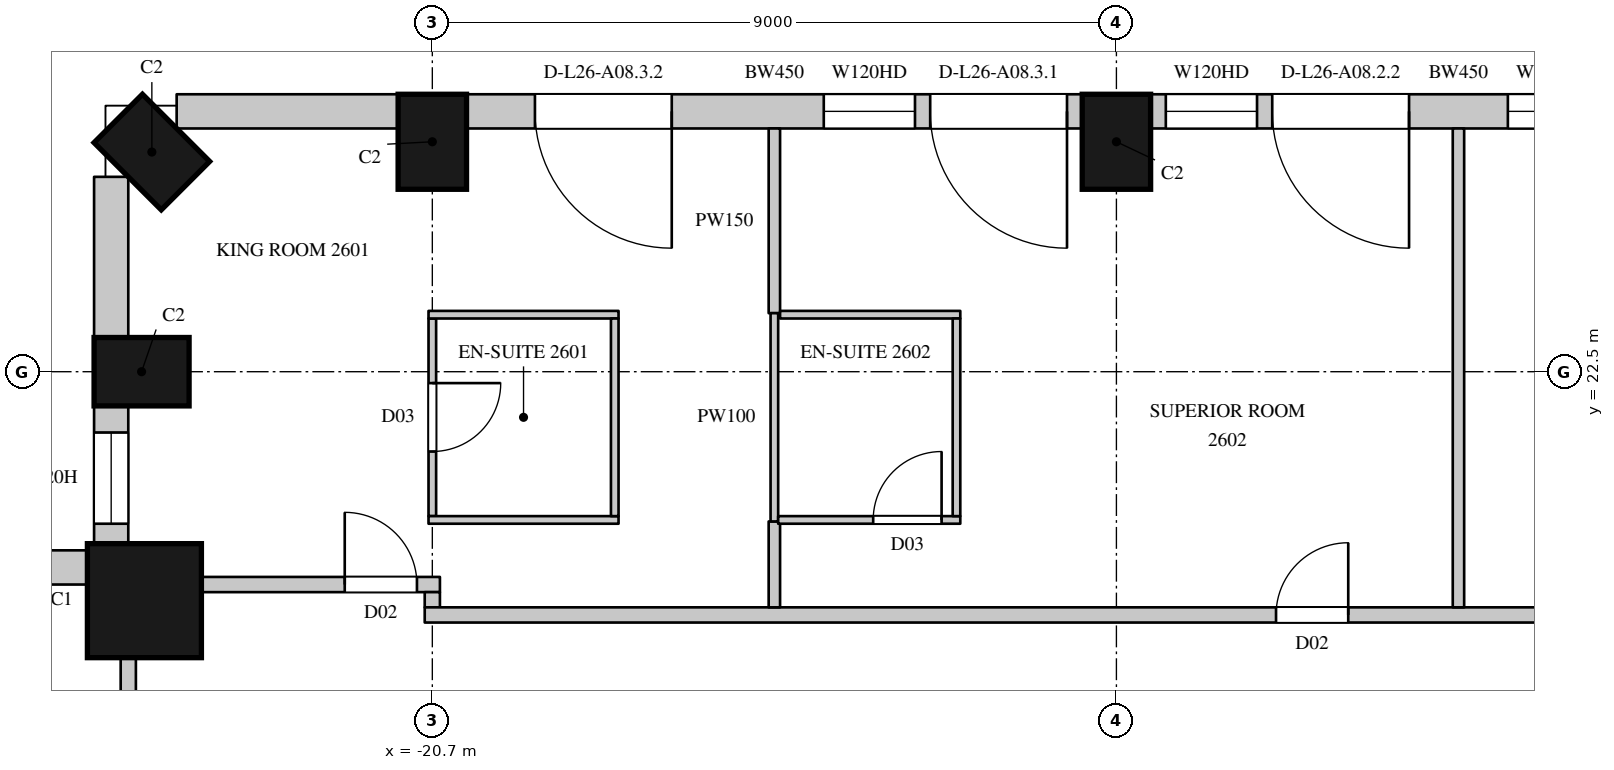
"""IFC4 building model, lengths in metres.
Left out: names, types, materials, properties, quantities, classifications, styles, units other than length and angle.
Written with IfcOpenShell. Run it as: python <this file> out.ifc"""

import sys

from ifc_helpers import new_model, si_unit, direction, frame, frame_2d, origin, origin_2d, place, context, subcontext, project, spatial, rectangle, circle, extrude, element, fill, save


model = new_model("IFC4")
c1 = context("Model", 3, precision=1e-05, world=origin(), true_north=direction((0.0, 1.0)))
c2 = subcontext(c1, "Body", "Model", "MODEL_VIEW")
j1 = project(units=[si_unit("LENGTHUNIT", "METRE"), si_unit("PLANEANGLEUNIT", "RADIAN")], contexts=[c1])
p1 = place(None, origin())
s1 = spatial("IfcSite", under=j1, at=p1, CompositionType="ELEMENT")
p2 = place(p1, origin())
s2 = spatial("IfcBuilding", under=s1, at=p2, CompositionType="ELEMENT")
p3 = place(p2, frame((0.0, 0.0, 123.9)))
s3 = spatial("IfcBuildingStorey", under=s2, at=p3, CompositionType="ELEMENT", Elevation=123.9)
for number, where, z_axis, x_axis in (
    (1, (-11.7, 25.525, 0.0), (0.0, 0.0, 1.0), (-1.0, 0.0, 0.0)),
    (2, (-20.7, 25.525, 0.0), (0.0, 0.0, 1.0), (-1.0, 0.0, 0.0)),
    (3, (-24.39, 25.39, 0.0), (0.0, 0.0, 1.0), (-0.707, -0.707, 0.0)),
    (4, (-24.525, 22.5, 0.0), (0.0, 0.0, 1.0), (0.0, -1.0, 0.0)),
):
    element("IfcColumn", number, at=place(p3, frame(where, z_axis=z_axis, x_axis=x_axis)), inside=s3, PredefinedType="COLUMN", context=c2, shape_type="SweptSolid", body=[
        extrude(rectangle(XDim=0.9, YDim=1.25, at=origin_2d()), origin(), (0.0, 0.0, 1.0), 3.6),
    ])
p4 = place(p3, frame((-24.488, 19.488, 0.0), z_axis=(0.0, 0.0, 1.0), x_axis=(1.0, 0.0, 0.0)))
e5 = element("IfcColumn", 5, at=p4, inside=s3, PredefinedType="COLUMN", context=c2, shape_type="SweptSolid", body=[
    extrude(circle(Radius=0.75, at=origin_2d()), origin(), (0.0, 0.0, 1.0), 3.6),
])
p5 = place(p3, frame((-3.15, 25.925, 0.0), z_axis=(0.0, 0.0, 1.0), x_axis=(-1.0, 0.0, 0.0)))
e6 = element("IfcWall", 6, at=p5, inside=s3, PredefinedType="SOLIDWALL", context=c2, shape_type="SweptSolid", body=[
    extrude(rectangle(XDim=8.1, YDim=0.45, at=frame_2d((4.05, 0.0))), origin(), (0.0, 0.0, 1.0), 3.3),
])
p6 = place(p5, frame((0.2, 0.0, 0.0)))
e7 = element("IfcOpeningElement", 7, at=p6, cuts=e6, PredefinedType="OPENING", context=c2, shape_type="SweptSolid", body=[
    extrude(rectangle(XDim=1.8, YDim=2.4, at=frame_2d((0.9, 1.2))), frame((0.0, 0.235, 0.0), z_axis=(0.0, -1.0, 0.0), x_axis=(1.0, 0.0, 0.0)), (0.0, 0.0, 1.0), 0.47),
])
p7 = place(p5, frame((2.2, 0.0, 1.05)))
e8 = element("IfcOpeningElement", 8, at=p7, cuts=e6, PredefinedType="OPENING", context=c2, shape_type="SweptSolid", body=[
    extrude(rectangle(XDim=1.2, YDim=2.0, at=frame_2d((0.6, 1.0))), frame((0.0, 0.235, 0.0), z_axis=(0.0, -1.0, 0.0), x_axis=(1.0, 0.0, 0.0)), (0.0, 0.0, 1.0), 0.47),
])
p8 = place(p5, frame((4.7, 0.0, 0.0)))
e9 = element("IfcOpeningElement", 9, at=p8, cuts=e6, PredefinedType="OPENING", context=c2, shape_type="SweptSolid", body=[
    extrude(rectangle(XDim=1.8, YDim=2.4, at=frame_2d((0.9, 1.2))), frame((0.0, 0.235, 0.0), z_axis=(0.0, -1.0, 0.0), x_axis=(1.0, 0.0, 0.0)), (0.0, 0.0, 1.0), 0.47),
])
p9 = place(p5, frame((6.7, 0.0, 1.05)))
e10 = element("IfcOpeningElement", 10, at=p9, cuts=e6, PredefinedType="OPENING", context=c2, shape_type="SweptSolid", body=[
    extrude(rectangle(XDim=1.2, YDim=2.0, at=frame_2d((0.6, 1.0))), frame((0.0, 0.235, 0.0), z_axis=(0.0, -1.0, 0.0), x_axis=(1.0, 0.0, 0.0)), (0.0, 0.0, 1.0), 0.47),
])
p10 = place(p3, frame((-12.15, 25.925, 0.0), z_axis=(0.0, 0.0, 1.0), x_axis=(-1.0, 0.0, 0.0)))
e11 = element("IfcWall", 11, at=p10, inside=s3, PredefinedType="SOLIDWALL", context=c2, shape_type="SweptSolid", body=[
    extrude(rectangle(XDim=8.1, YDim=0.45, at=frame_2d((4.05, 0.0))), origin(), (0.0, 0.0, 1.0), 3.3),
])
p11 = place(p10, frame((0.2, 0.0, 0.0)))
e12 = element("IfcOpeningElement", 12, at=p11, cuts=e11, PredefinedType="OPENING", context=c2, shape_type="SweptSolid", body=[
    extrude(rectangle(XDim=1.8, YDim=2.4, at=frame_2d((0.9, 1.2))), frame((0.0, 0.235, 0.0), z_axis=(0.0, -1.0, 0.0), x_axis=(1.0, 0.0, 0.0)), (0.0, 0.0, 1.0), 0.47),
])
p12 = place(p10, frame((2.2, 0.0, 1.05)))
e13 = element("IfcOpeningElement", 13, at=p12, cuts=e11, PredefinedType="OPENING", context=c2, shape_type="SweptSolid", body=[
    extrude(rectangle(XDim=1.2, YDim=2.0, at=frame_2d((0.6, 1.0))), frame((0.0, 0.235, 0.0), z_axis=(0.0, -1.0, 0.0), x_axis=(1.0, 0.0, 0.0)), (0.0, 0.0, 1.0), 0.47),
])
p13 = place(p10, frame((5.4, 0.0, 0.0)))
e14 = element("IfcOpeningElement", 14, at=p13, cuts=e11, PredefinedType="OPENING", context=c2, shape_type="SweptSolid", body=[
    extrude(rectangle(XDim=1.8, YDim=2.4, at=frame_2d((0.9, 1.2))), frame((0.0, 0.235, 0.0), z_axis=(0.0, -1.0, 0.0), x_axis=(1.0, 0.0, 0.0)), (0.0, 0.0, 1.0), 0.47),
])
p14 = place(p3, frame((-21.15, 25.925, 0.0), z_axis=(0.0, 0.0, 1.0), x_axis=(-1.0, 0.0, 0.0)))
e15 = element("IfcWall", 15, at=p14, inside=s3, PredefinedType="SOLIDWALL", context=c2, shape_type="SweptSolid", body=[
    extrude(rectangle(XDim=2.914, YDim=0.45, at=frame_2d((1.457, 0.0))), origin(), (0.0, 0.0, 1.0), 3.3),
])
p15 = place(p3, frame((-24.925, 25.064, 0.0), z_axis=(0.0, 0.0, 1.0), x_axis=(0.0, -1.0, 0.0)))
e16 = element("IfcWall", 16, at=p15, inside=s3, PredefinedType="SOLIDWALL", context=c2, shape_type="SweptSolid", body=[
    extrude(rectangle(XDim=2.114, YDim=0.45, at=frame_2d((1.057, 0.0))), origin(), (0.0, 0.0, 1.0), 3.3),
])
p16 = place(p3, frame((-24.925, 22.05, 0.0), z_axis=(0.0, 0.0, 1.0), x_axis=(0.0, -1.0, 0.0)))
e17 = element("IfcWall", 17, at=p16, inside=s3, PredefinedType="SOLIDWALL", context=c2, shape_type="SweptSolid", body=[
    extrude(rectangle(XDim=1.843, YDim=0.45, at=frame_2d((0.921, 0.0))), origin(), (0.0, 0.0, 1.0), 3.3),
])
p17 = place(p16, frame((0.35, 0.0, 1.05)))
e18 = element("IfcOpeningElement", 18, at=p17, cuts=e17, PredefinedType="OPENING", context=c2, shape_type="SweptSolid", body=[
    extrude(rectangle(XDim=1.2, YDim=2.0, at=frame_2d((0.6, 1.0))), frame((0.0, 0.235, 0.0), z_axis=(0.0, -1.0, 0.0), x_axis=(1.0, 0.0, 0.0)), (0.0, 0.0, 1.0), 0.47),
])
p18 = place(p3, frame((-25.207, 19.925, 0.0), z_axis=(0.0, 0.0, 1.0), x_axis=(-1.0, 0.0, 0.0)))
e19 = element("IfcWall", 19, at=p18, inside=s3, PredefinedType="SOLIDWALL", context=c2, shape_type="SweptSolid", body=[
    extrude(rectangle(XDim=3.857, YDim=0.45, at=frame_2d((1.928, 0.0))), origin(), (0.0, 0.0, 1.0), 3.3),
])
p19 = place(p18, frame((0.643, 0.0, 1.05)))
e20 = element("IfcOpeningElement", 20, at=p19, cuts=e19, PredefinedType="OPENING", context=c2, shape_type="SweptSolid", body=[
    extrude(rectangle(XDim=2.7, YDim=2.0, at=frame_2d((1.35, 1.0))), frame((0.0, 0.235, 0.0), z_axis=(0.0, -1.0, 0.0), x_axis=(1.0, 0.0, 0.0)), (0.0, 0.0, 1.0), 0.47),
])
p20 = place(p3, frame((-24.7, 16.03, 0.0), z_axis=(0.0, 0.0, 1.0), x_axis=(0.0, 1.0, 0.0)))
e21 = element("IfcWall", 21, at=p20, inside=s3, PredefinedType="PARTITIONING", context=c2, shape_type="SweptSolid", body=[
    extrude(rectangle(XDim=2.722, YDim=0.2, at=frame_2d((1.361, 0.0))), origin(), (0.0, 0.0, 1.0), 3.3),
])
p21 = place(p20, frame((0.45, 0.0, 0.0)))
e22 = element("IfcOpeningElement", 22, at=p21, cuts=e21, PredefinedType="OPENING", context=c2, shape_type="SweptSolid", body=[
    extrude(rectangle(XDim=1.6, YDim=2.4, at=frame_2d((0.8, 1.2))), frame((0.0, 0.11, 0.0), z_axis=(0.0, -1.0, 0.0), x_axis=(1.0, 0.0, 0.0)), (0.0, 0.0, 1.0), 0.22),
])
p22 = place(p3, frame((-23.752, 19.7, 0.0), z_axis=(0.0, 0.0, 1.0), x_axis=(1.0, 0.0, 0.0)))
e23 = element("IfcWall", 23, at=p22, inside=s3, PredefinedType="PARTITIONING", context=c2, shape_type="SweptSolid", body=[
    extrude(rectangle(XDim=3.152, YDim=0.2, at=frame_2d((1.576, 0.0))), origin(), (0.0, 0.0, 1.0), 3.3),
])
p23 = place(p22, frame((1.9, 0.0, 0.0)))
e24 = element("IfcOpeningElement", 24, at=p23, cuts=e23, PredefinedType="OPENING", context=c2, shape_type="SweptSolid", body=[
    extrude(rectangle(XDim=0.95, YDim=2.2, at=frame_2d((0.475, 1.1))), frame((0.0, 0.11, 0.0), z_axis=(0.0, -1.0, 0.0), x_axis=(1.0, 0.0, 0.0)), (0.0, 0.0, 1.0), 0.22),
])
p24 = place(p3, frame((-20.7, 19.4, 0.0), z_axis=(0.0, 0.0, 1.0), x_axis=(0.0, 1.0, 0.0)))
e25 = element("IfcWall", 25, at=p24, inside=s3, PredefinedType="PARTITIONING", context=c2, shape_type="SweptSolid", body=[
    extrude(rectangle(XDim=0.2, YDim=0.2, at=frame_2d((0.1, 0.0))), origin(), (0.0, 0.0, 1.0), 3.3),
])
p25 = place(p3, frame((-20.8, 19.3, 0.0), z_axis=(0.0, 0.0, 1.0), x_axis=(1.0, 0.0, 0.0)))
e26 = element("IfcWall", 26, at=p25, inside=s3, PredefinedType="PARTITIONING", context=c2, shape_type="SweptSolid", body=[
    extrude(rectangle(XDim=38.464, YDim=0.2, at=frame_2d((19.232, 0.0))), origin(), (0.0, 0.0, 1.0), 3.3),
])
p26 = place(p25, frame((24.05, 0.0, 0.0)))
e27 = element("IfcOpeningElement", 27, at=p26, cuts=e26, PredefinedType="OPENING", context=c2, shape_type="SweptSolid", body=[
    extrude(rectangle(XDim=0.9, YDim=2.2, at=frame_2d((0.45, 1.1))), frame((0.0, 0.11, 0.0), z_axis=(0.0, -1.0, 0.0), x_axis=(1.0, 0.0, 0.0)), (0.0, 0.0, 1.0), 0.22),
])
p27 = place(p25, frame((11.2, 0.0, 0.0)))
e28 = element("IfcOpeningElement", 28, at=p27, cuts=e26, PredefinedType="OPENING", context=c2, shape_type="SweptSolid", body=[
    extrude(rectangle(XDim=0.95, YDim=2.2, at=frame_2d((0.475, 1.1))), frame((0.0, 0.11, 0.0), z_axis=(0.0, -1.0, 0.0), x_axis=(1.0, 0.0, 0.0)), (0.0, 0.0, 1.0), 0.22),
])
p28 = place(p25, frame((15.05, 0.0, 0.0)))
e29 = element("IfcOpeningElement", 29, at=p28, cuts=e26, PredefinedType="OPENING", context=c2, shape_type="SweptSolid", body=[
    extrude(rectangle(XDim=0.95, YDim=2.2, at=frame_2d((0.475, 1.1))), frame((0.0, 0.11, 0.0), z_axis=(0.0, -1.0, 0.0), x_axis=(1.0, 0.0, 0.0)), (0.0, 0.0, 1.0), 0.22),
])
p29 = place(p25, frame((32.0, 0.0, 0.0)))
e30 = element("IfcOpeningElement", 30, at=p29, cuts=e26, PredefinedType="OPENING", context=c2, shape_type="SweptSolid", body=[
    extrude(rectangle(XDim=0.95, YDim=2.2, at=frame_2d((0.475, 1.1))), frame((0.0, 0.11, 0.0), z_axis=(0.0, -1.0, 0.0), x_axis=(1.0, 0.0, 0.0)), (0.0, 0.0, 1.0), 0.22),
])
p30 = place(p3, frame((-16.2, 19.4, 0.0), z_axis=(0.0, 0.0, 1.0), x_axis=(0.0, 1.0, 0.0)))
e31 = element("IfcWall", 31, at=p30, inside=s3, PredefinedType="PARTITIONING", context=c2, shape_type="SweptSolid", body=[
    extrude(rectangle(XDim=1.13, YDim=0.15, at=frame_2d((0.565, 0.0))), origin(), (0.0, 0.0, 1.0), 2.65),
])
p31 = place(p3, frame((-16.2, 23.27, 0.0), z_axis=(0.0, 0.0, 1.0), x_axis=(0.0, 1.0, 0.0)))
e32 = element("IfcWall", 32, at=p31, inside=s3, PredefinedType="PARTITIONING", context=c2, shape_type="SweptSolid", body=[
    extrude(rectangle(XDim=2.43, YDim=0.15, at=frame_2d((1.215, 0.0))), origin(), (0.0, 0.0, 1.0), 2.65),
])
p32 = place(p3, frame((-7.2, 19.4, 0.0), z_axis=(0.0, 0.0, 1.0), x_axis=(0.0, 1.0, 0.0)))
e33 = element("IfcWall", 33, at=p32, inside=s3, PredefinedType="PARTITIONING", context=c2, shape_type="SweptSolid", body=[
    extrude(rectangle(XDim=6.3, YDim=0.15, at=frame_2d((3.15, 0.0))), origin(), (0.0, 0.0, 1.0), 2.65),
])
p33 = place(p3, frame((-20.7, 20.6, 0.0), z_axis=(0.0, 0.0, 1.0), x_axis=(0.0, 1.0, 0.0)))
e34 = element("IfcWall", 34, at=p33, inside=s3, PredefinedType="PARTITIONING", context=c2, shape_type="SweptSolid", body=[
    extrude(rectangle(XDim=2.6, YDim=0.1, at=frame_2d((1.3, 0.0))), origin(), (0.0, 0.0, 1.0), 2.75),
])
p34 = place(p33, frame((0.85, 0.0, 0.0)))
e35 = element("IfcOpeningElement", 35, at=p34, cuts=e34, PredefinedType="OPENING", context=c2, shape_type="SweptSolid", body=[
    extrude(rectangle(XDim=0.9, YDim=2.2, at=frame_2d((0.45, 1.1))), frame((0.0, 0.06, 0.0), z_axis=(0.0, -1.0, 0.0), x_axis=(1.0, 0.0, 0.0)), (0.0, 0.0, 1.0), 0.12),
])
for number, where, z_axis, x_axis in (
    (36, (-20.75, 20.55, 0.0), (0.0, 0.0, 1.0), (1.0, 0.0, 0.0)),
    (37, (-20.75, 23.25, 0.0), (0.0, 0.0, 1.0), (1.0, 0.0, 0.0)),
):
    element("IfcWall", number, at=place(p3, frame(where, z_axis=z_axis, x_axis=x_axis)), inside=s3, PredefinedType="PARTITIONING", context=c2, shape_type="SweptSolid", body=[
        extrude(rectangle(XDim=2.5, YDim=0.1, at=frame_2d((1.25, 0.0))), origin(), (0.0, 0.0, 1.0), 3.3),
    ])
p35 = place(p3, frame((-18.3, 20.6, 0.0), z_axis=(0.0, 0.0, 1.0), x_axis=(0.0, 1.0, 0.0)))
e38 = element("IfcWall", 38, at=p35, inside=s3, PredefinedType="PARTITIONING", context=c2, shape_type="SweptSolid", body=[
    extrude(rectangle(XDim=2.6, YDim=0.1, at=frame_2d((1.3, 0.0))), origin(), (0.0, 0.0, 1.0), 3.3),
])
p36 = place(p3, frame((-16.2, 20.53, 0.0), z_axis=(0.0, 0.0, 1.0), x_axis=(0.0, 1.0, 0.0)))
e39 = element("IfcWall", 39, at=p36, inside=s3, PredefinedType="PARTITIONING", context=c2, shape_type="SweptSolid", body=[
    extrude(rectangle(XDim=2.74, YDim=0.1, at=frame_2d((1.37, 0.0))), origin(), (0.0, 0.0, 1.0), 2.65),
])
p37 = place(p3, frame((-16.15, 20.55, 0.0), z_axis=(0.0, 0.0, 1.0), x_axis=(1.0, 0.0, 0.0)))
e40 = element("IfcWall", 40, at=p37, inside=s3, PredefinedType="PARTITIONING", context=c2, shape_type="SweptSolid", body=[
    extrude(rectangle(XDim=2.396, YDim=0.1, at=frame_2d((1.198, 0.0))), origin(), (0.0, 0.0, 1.0), 3.3),
])
p38 = place(p37, frame((1.25, 0.0, 0.0)))
e41 = element("IfcOpeningElement", 41, at=p38, cuts=e40, PredefinedType="OPENING", context=c2, shape_type="SweptSolid", body=[
    extrude(rectangle(XDim=0.9, YDim=2.2, at=frame_2d((0.45, 1.1))), frame((0.0, 0.06, 0.0), z_axis=(0.0, -1.0, 0.0), x_axis=(1.0, 0.0, 0.0)), (0.0, 0.0, 1.0), 0.12),
])
p39 = place(p3, frame((-16.125, 23.25, 0.0), z_axis=(0.0, 0.0, 1.0), x_axis=(1.0, 0.0, 0.0)))
e42 = element("IfcWall", 42, at=p39, inside=s3, PredefinedType="PARTITIONING", context=c2, shape_type="SweptSolid", body=[
    extrude(rectangle(XDim=2.371, YDim=0.1, at=frame_2d((1.186, 0.0))), origin(), (0.0, 0.0, 1.0), 3.3),
])
p40 = place(p3, frame((-13.804, 20.6, 0.0), z_axis=(0.0, 0.0, 1.0), x_axis=(0.0, 1.0, 0.0)))
e43 = element("IfcWall", 43, at=p40, inside=s3, PredefinedType="PARTITIONING", context=c2, shape_type="SweptSolid", body=[
    extrude(rectangle(XDim=2.6, YDim=0.1, at=frame_2d((1.3, 0.0))), origin(), (0.0, 0.0, 1.0), 3.3),
])
p41 = place(p7, origin())
e44 = element("IfcWindow", 44, at=p41, inside=s3, PartitioningType="SINGLE_PANEL", PredefinedType="WINDOW", context=c2, shape_type="SweptSolid", body=[
    extrude(rectangle(XDim=1.2, YDim=2.0, at=frame_2d((0.6, 1.0))), frame((0.0, 0.135, 0.0), z_axis=(0.0, -1.0, 0.0), x_axis=(1.0, 0.0, 0.0)), (0.0, 0.0, 1.0), 0.06),
])
fill(e8, e44)
p42 = place(p8, origin())
e45 = element("IfcDoor", 45, at=p42, inside=s3, OperationType="SLIDING_TO_LEFT", PredefinedType="DOOR", context=c2, shape_type="SweptSolid", body=[
    extrude(rectangle(XDim=1.8, YDim=2.4, at=frame_2d((0.9, 1.2))), frame((0.0, 0.13, 0.0), z_axis=(0.0, -1.0, 0.0), x_axis=(1.0, 0.0, 0.0)), (0.0, 0.0, 1.0), 0.05),
])
fill(e9, e45)
p43 = place(p9, origin())
e46 = element("IfcWindow", 46, at=p43, inside=s3, PartitioningType="SINGLE_PANEL", PredefinedType="WINDOW", context=c2, shape_type="SweptSolid", body=[
    extrude(rectangle(XDim=1.2, YDim=2.0, at=frame_2d((0.6, 1.0))), frame((0.0, 0.135, 0.0), z_axis=(0.0, -1.0, 0.0), x_axis=(1.0, 0.0, 0.0)), (0.0, 0.0, 1.0), 0.06),
])
fill(e10, e46)
p44 = place(p11, origin())
e47 = element("IfcDoor", 47, at=p44, inside=s3, OperationType="SLIDING_TO_LEFT", PredefinedType="DOOR", context=c2, shape_type="SweptSolid", body=[
    extrude(rectangle(XDim=1.8, YDim=2.4, at=frame_2d((0.9, 1.2))), frame((0.0, 0.13, 0.0), z_axis=(0.0, -1.0, 0.0), x_axis=(1.0, 0.0, 0.0)), (0.0, 0.0, 1.0), 0.05),
])
fill(e12, e47)
p45 = place(p12, origin())
e48 = element("IfcWindow", 48, at=p45, inside=s3, PartitioningType="SINGLE_PANEL", PredefinedType="WINDOW", context=c2, shape_type="SweptSolid", body=[
    extrude(rectangle(XDim=1.2, YDim=2.0, at=frame_2d((0.6, 1.0))), frame((0.0, 0.135, 0.0), z_axis=(0.0, -1.0, 0.0), x_axis=(1.0, 0.0, 0.0)), (0.0, 0.0, 1.0), 0.06),
])
fill(e13, e48)
p46 = place(p13, origin())
e49 = element("IfcDoor", 49, at=p46, inside=s3, OperationType="SLIDING_TO_LEFT", PredefinedType="DOOR", context=c2, shape_type="SweptSolid", body=[
    extrude(rectangle(XDim=1.8, YDim=2.4, at=frame_2d((0.9, 1.2))), frame((0.0, 0.13, 0.0), z_axis=(0.0, -1.0, 0.0), x_axis=(1.0, 0.0, 0.0)), (0.0, 0.0, 1.0), 0.05),
])
fill(e14, e49)
p47 = place(p17, origin())
e50 = element("IfcWindow", 50, at=p47, inside=s3, PartitioningType="SINGLE_PANEL", PredefinedType="WINDOW", context=c2, shape_type="SweptSolid", body=[
    extrude(rectangle(XDim=1.2, YDim=2.0, at=frame_2d((0.6, 1.0))), frame((0.0, 0.135, 0.0), z_axis=(0.0, -1.0, 0.0), x_axis=(1.0, 0.0, 0.0)), (0.0, 0.0, 1.0), 0.06),
])
fill(e18, e50)
p48 = place(p23, origin())
e51 = element("IfcDoor", 51, at=p48, inside=s3, OperationType="SINGLE_SWING_LEFT", PredefinedType="DOOR", context=c2, shape_type="SweptSolid", body=[
    extrude(rectangle(XDim=0.95, YDim=2.2, at=frame_2d((0.475, 1.1))), frame((0.0, 0.025, 0.0), z_axis=(0.0, -1.0, 0.0), x_axis=(1.0, 0.0, 0.0)), (0.0, 0.0, 1.0), 0.05),
])
fill(e24, e51)
p49 = place(p34, origin())
e52 = element("IfcDoor", 52, at=p49, inside=s3, OperationType="SINGLE_SWING_LEFT", PredefinedType="DOOR", context=c2, shape_type="SweptSolid", body=[
    extrude(rectangle(XDim=0.9, YDim=2.2, at=frame_2d((0.45, 1.1))), frame((0.0, 0.025, 0.0), z_axis=(0.0, -1.0, 0.0), x_axis=(1.0, 0.0, 0.0)), (0.0, 0.0, 1.0), 0.05),
])
fill(e35, e52)
p50 = place(p27, origin())
e53 = element("IfcDoor", 53, at=p50, inside=s3, OperationType="SINGLE_SWING_RIGHT", PredefinedType="DOOR", context=c2, shape_type="SweptSolid", body=[
    extrude(rectangle(XDim=0.95, YDim=2.2, at=frame_2d((0.475, 1.1))), frame((0.0, 0.025, 0.0), z_axis=(0.0, -1.0, 0.0), x_axis=(1.0, 0.0, 0.0)), (0.0, 0.0, 1.0), 0.05),
])
fill(e28, e53)
p51 = place(p38, origin())
e54 = element("IfcDoor", 54, at=p51, inside=s3, OperationType="SINGLE_SWING_RIGHT", PredefinedType="DOOR", context=c2, shape_type="SweptSolid", body=[
    extrude(rectangle(XDim=0.9, YDim=2.2, at=frame_2d((0.45, 1.1))), frame((0.0, 0.025, 0.0), z_axis=(0.0, -1.0, 0.0), x_axis=(1.0, 0.0, 0.0)), (0.0, 0.0, 1.0), 0.05),
])
fill(e41, e54)
save(model, sys.argv[1])
